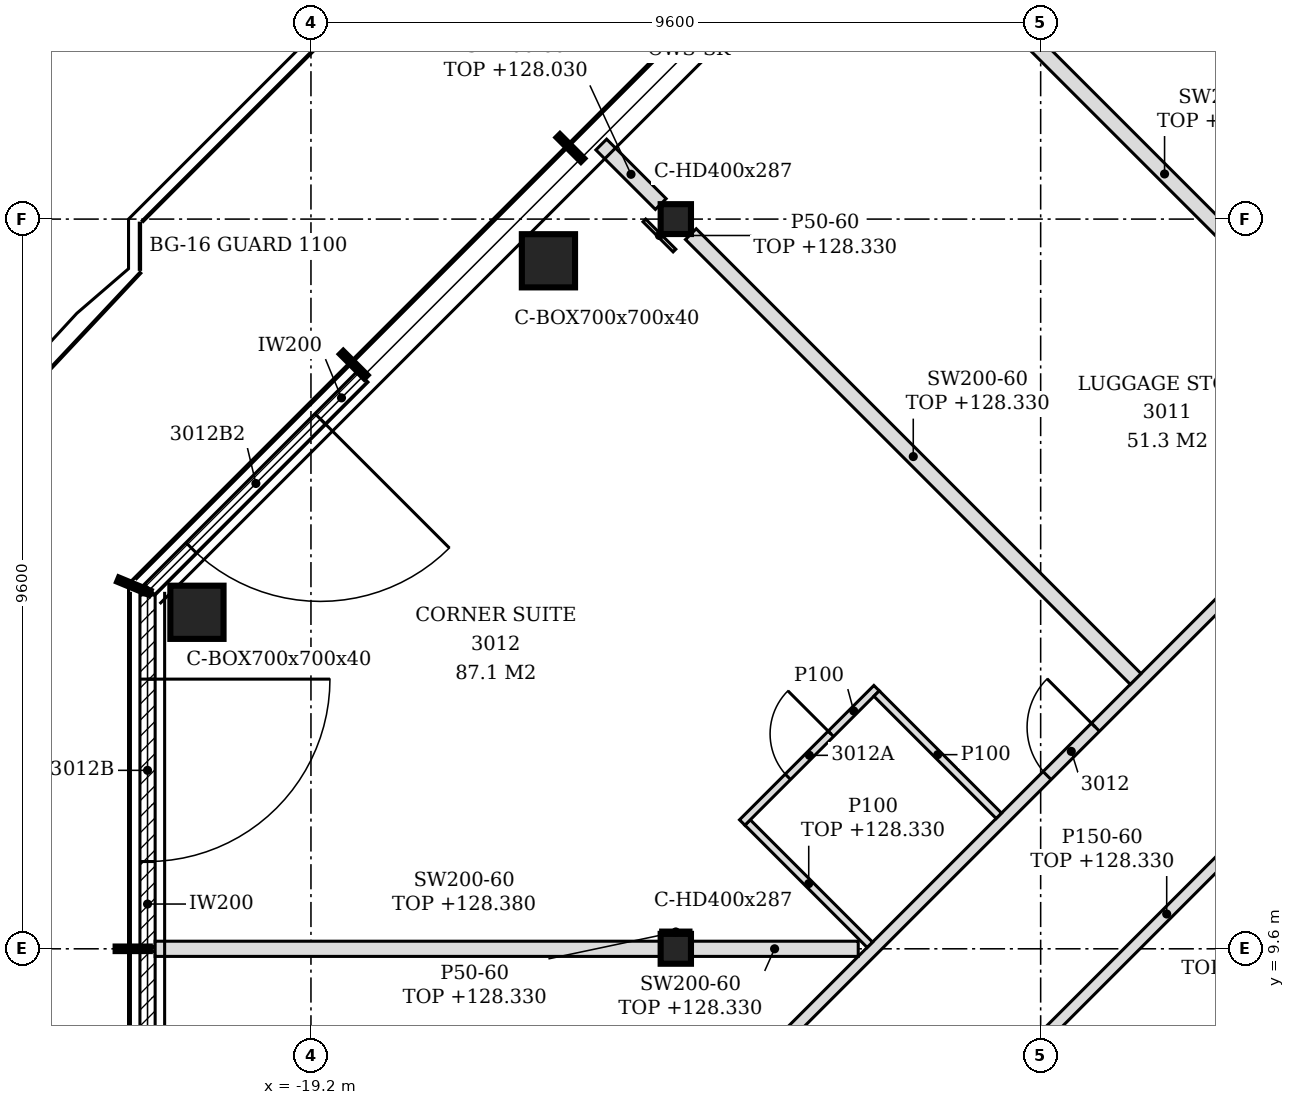
"""IFC4 building model, lengths in metres.
Left out: names, types, materials, properties, quantities, classifications, styles, units other than length and angle.
Written with IfcOpenShell. Run it as: python <this file> out.ifc"""

import sys

from ifc_helpers import new_model, si_unit, direction, frame, frame_2d, origin, origin_2d, place, context, subcontext, project, spatial, polyline, rectangle, hollow_rectangle, i_section, outline, extrude, element, fill, save


model = new_model("IFC4")
c1 = context("Model", 3, precision=1e-05, world=origin(), true_north=direction((0.0, 1.0)))
c2 = subcontext(c1, "Body", "Model", "MODEL_VIEW")
j1 = project(units=[si_unit("LENGTHUNIT", "METRE"), si_unit("PLANEANGLEUNIT", "RADIAN")], contexts=[c1])
p1 = place(None, origin())
s1 = spatial("IfcSite", under=j1, at=p1, CompositionType="ELEMENT")
p2 = place(p1, origin())
s2 = spatial("IfcBuilding", under=s1, at=p2, CompositionType="ELEMENT")
p3 = place(p2, frame((0.0, 0.0, 125.4)))
s3 = spatial("IfcBuildingStorey", under=s2, at=p3, CompositionType="ELEMENT", Elevation=125.4)
for number, where, z_axis, x_axis in (
    (1, (-16.076, 18.652, -0.15), (0.0, 0.0, 1.0), (1.0, 0.0, 0.0)),
    (2, (-20.7, 14.027, -0.15), (0.0, 0.0, 1.0), (1.0, 0.0, 0.0)),
):
    element("IfcColumn", number, at=place(p3, frame(where, z_axis=z_axis, x_axis=x_axis)), inside=s3, PredefinedType="COLUMN", context=c2, shape_type="SweptSolid", body=[
        extrude(hollow_rectangle(XDim=0.7, YDim=0.7, WallThickness=0.04, at=origin_2d()), origin(), (0.0, 0.0, 1.0), 3.6),
    ])
for number, where, z_axis, x_axis in (
    (3, (-14.4, 9.6, -0.15), (0.0, 0.0, 1.0), (1.0, 0.0, 0.0)),
    (4, (-14.4, 19.2, -0.15), (0.0, 0.0, 1.0), (1.0, 0.0, 0.0)),
):
    element("IfcColumn", number, at=place(p3, frame(where, z_axis=z_axis, x_axis=x_axis)), inside=s3, PredefinedType="COLUMN", context=c2, shape_type="SweptSolid", body=[
        extrude(i_section(OverallWidth=0.399, OverallDepth=0.393, WebThickness=0.023, FlangeThickness=0.037, FilletRadius=0.015, at=origin_2d()), origin(), (0.0, 0.0, 1.0), 3.6),
    ])
p4 = place(p3, frame((-18.521, 17.126, 0.0), z_axis=(0.0, 0.0, 1.0), x_axis=(-0.707106781187, -0.707106781187, 0.0)))
e5 = element("IfcWall", 5, at=p4, inside=s3, PredefinedType="NOTDEFINED", context=c2, shape_type="SweptSolid", body=[
    extrude(rectangle(XDim=3.962, YDim=0.2, at=frame_2d((1.981, 0.0))), origin(), (0.0, 0.0, 1.0), 3.45),
])
p5 = place(p4, frame((0.786, 0.0, 0.0)))
e6 = element("IfcOpeningElement", 6, at=p5, cuts=e5, PredefinedType="OPENING", context=c2, shape_type="SweptSolid", body=[
    extrude(rectangle(XDim=2.4, YDim=2.4, at=frame_2d((1.2, 1.2))), frame((0.0, 0.11, 0.0), z_axis=(0.0, -1.0, 0.0), x_axis=(1.0, 0.0, 0.0)), (0.0, 0.0, 1.0), 0.22),
])
p6 = place(p3, frame((-21.35, 14.256, 0.0), z_axis=(0.0, 0.0, 1.0), x_axis=(0.0, -1.0, 0.0)))
e7 = element("IfcWall", 7, at=p6, inside=s3, PredefinedType="NOTDEFINED", context=c2, shape_type="SweptSolid", body=[
    extrude(rectangle(XDim=4.626, YDim=0.2, at=frame_2d((2.313, 0.0))), origin(), (0.0, 0.0, 1.0), 3.45),
])
p7 = place(p6, frame((1.108, 0.0, 0.0)))
e8 = element("IfcOpeningElement", 8, at=p7, cuts=e7, PredefinedType="OPENING", context=c2, shape_type="SweptSolid", body=[
    extrude(rectangle(XDim=2.4, YDim=2.4, at=frame_2d((1.2, 1.2))), frame((0.0, 0.11, 0.0), z_axis=(0.0, -1.0, 0.0), x_axis=(1.0, 0.0, 0.0)), (0.0, 0.0, 1.0), 0.22),
])
p8 = place(p3, frame((-21.35, 9.57, 0.0), z_axis=(0.0, 0.0, 1.0), x_axis=(0.0, -1.0, 0.0)))
e9 = element("IfcWall", 9, at=p8, inside=s3, PredefinedType="NOTDEFINED", context=c2, shape_type="SweptSolid", body=[
    extrude(rectangle(XDim=4.74, YDim=0.2, at=frame_2d((2.37, 0.0))), origin(), (0.0, 0.0, 1.0), 3.45),
])
p9 = place(p8, frame((1.17, 0.0, 0.0)))
e10 = element("IfcOpeningElement", 10, at=p9, cuts=e9, PredefinedType="OPENING", context=c2, shape_type="SweptSolid", body=[
    extrude(rectangle(XDim=2.4, YDim=2.4, at=frame_2d((1.2, 1.2))), frame((0.0, 0.11, 0.0), z_axis=(0.0, -1.0, 0.0), x_axis=(1.0, 0.0, 0.0)), (0.0, 0.0, 1.0), 0.22),
])
p10 = place(p3, frame((-10.875, 7.125, 0.0), z_axis=(0.0, 0.0, 1.0), x_axis=(0.707106781187, 0.707106781187, 0.0)))
e11 = element("IfcWall", 11, at=p10, inside=s3, PredefinedType="PARTITIONING", context=c2, shape_type="SweptSolid", body=[
    extrude(rectangle(XDim=8.296, YDim=0.15, at=frame_2d((4.148, 0.0))), origin(), (0.0, 0.0, 1.0), 2.93),
])
p11 = place(p3, frame((-13.275, 8.119, 0.0), z_axis=(0.0, 0.0, 1.0), x_axis=(0.707099678619, 0.707113883683, 0.0)))
e12 = element("IfcWall", 12, at=p11, inside=s3, PredefinedType="PARTITIONING", context=c2, shape_type="SweptSolid", body=[
    extrude(rectangle(XDim=17.187, YDim=0.15, at=frame_2d((8.593, 0.0))), origin(), (0.0, 0.0, 1.0), 2.73),
])
p12 = place(p11, frame((9.073, 0.0, 0.0)))
e13 = element("IfcOpeningElement", 13, at=p12, cuts=e12, PredefinedType="OPENING", context=c2, shape_type="SweptSolid", body=[
    extrude(rectangle(XDim=0.9, YDim=2.1, at=frame_2d((0.45, 1.05))), frame((0.0, 0.085, 0.0), z_axis=(0.0, -1.0, 0.0), x_axis=(1.0, 0.0, 0.0)), (0.0, 0.0, 1.0), 0.17),
])
p13 = place(p11, frame((5.317, 0.0, 0.0)))
e14 = element("IfcOpeningElement", 14, at=p13, cuts=e12, PredefinedType="OPENING", context=c2, shape_type="SweptSolid", body=[
    extrude(rectangle(XDim=0.9, YDim=2.1, at=frame_2d((0.45, 1.05))), frame((0.0, 0.085, 0.0), z_axis=(0.0, -1.0, 0.0), x_axis=(1.0, 0.0, 0.0)), (0.0, 0.0, 1.0), 0.17),
])
p14 = place(p3, frame((-21.25, 9.6, 0.0), z_axis=(0.0, 0.0, 1.0), x_axis=(1.0, 0.0, 0.0)))
e15 = element("IfcWall", 15, at=p14, inside=s3, PredefinedType="PARTITIONING", context=c2, shape_type="SweptSolid", body=[
    extrude(outline(polyline([(0.0, 0.0), (6.65, 0.0), (6.65, 2.98), (0.7, 2.98), (0.698, 2.93), (0.4, 2.93), (0.398, 2.98), (0.0, 2.98), (0.0, 0.0)])), frame((0.0, 0.1, 0.0), z_axis=(0.0, -1.0, 0.0), x_axis=(1.0, 0.0, 0.0)), (0.0, 0.0, 1.0), 0.2),
])
p15 = place(p3, frame((-14.2, 9.6, 0.0), z_axis=(0.0, 0.0, 1.0), x_axis=(1.0, 0.0, 0.0)))
e16 = element("IfcWall", 16, at=p15, inside=s3, PredefinedType="PARTITIONING", context=c2, shape_type="SweptSolid", body=[
    extrude(rectangle(XDim=2.2, YDim=0.2, at=frame_2d((1.1, 0.0))), origin(), (0.0, 0.0, 1.0), 2.93),
])
p16 = place(p3, frame((-11.847, 9.653, 0.0), z_axis=(0.0, 0.0, 1.0), x_axis=(-0.707106781187, 0.707106781187, 0.0)))
e17 = element("IfcWall", 17, at=p16, inside=s3, PredefinedType="PARTITIONING", context=c2, shape_type="SweptSolid", body=[
    extrude(rectangle(XDim=2.275, YDim=0.1, at=frame_2d((1.137, 0.0))), origin(), (0.0, 0.0, 1.0), 2.93),
])
p17 = place(p3, frame((-13.526, 11.262, 0.0), z_axis=(0.0, 0.0, 1.0), x_axis=(0.707106781187, 0.707106781187, 0.0)))
e18 = element("IfcWall", 18, at=p17, inside=s3, PredefinedType="PARTITIONING", context=c2, shape_type="SweptSolid", body=[
    extrude(rectangle(XDim=2.5, YDim=0.1, at=frame_2d((1.25, 0.0))), origin(), (0.0, 0.0, 1.0), 3.45),
])
p18 = place(p17, frame((0.85, 0.0, 0.0)))
e19 = element("IfcOpeningElement", 19, at=p18, cuts=e18, PredefinedType="OPENING", context=c2, shape_type="SweptSolid", body=[
    extrude(rectangle(XDim=0.8, YDim=2.1, at=frame_2d((0.4, 1.05))), frame((0.0, 0.06, 0.0), z_axis=(0.0, -1.0, 0.0), x_axis=(1.0, 0.0, 0.0)), (0.0, 0.0, 1.0), 0.12),
])
p19 = place(p3, frame((-10.15, 11.35, 0.0), z_axis=(0.0, 0.0, 1.0), x_axis=(-0.707160441348, 0.707053116953, 0.0)))
e20 = element("IfcWall", 20, at=p19, inside=s3, PredefinedType="PARTITIONING", context=c2, shape_type="SweptSolid", body=[
    extrude(rectangle(XDim=2.275, YDim=0.1, at=frame_2d((1.137, 0.0))), origin(), (0.0, 0.0, 1.0), 3.45),
])
p20 = place(p3, frame((-8.35, 13.15, 0.0), z_axis=(0.0, 0.0, 1.0), x_axis=(-0.707092030896, 0.707121531169, 0.0)))
e21 = element("IfcWall", 21, at=p20, inside=s3, PredefinedType="PARTITIONING", context=c2, shape_type="SweptSolid", body=[
    extrude(rectangle(XDim=8.276, YDim=0.2, at=frame_2d((4.138, 0.0))), origin(), (0.0, 0.0, 1.0), 2.93),
])
p21 = place(p3, frame((-4.838, 16.662, 0.0), z_axis=(0.0, 0.0, 1.0), x_axis=(-0.707120561855, 0.707093000249, 0.0)))
e22 = element("IfcWall", 22, at=p21, inside=s3, PredefinedType="PARTITIONING", context=c2, shape_type="SweptSolid", body=[
    extrude(rectangle(XDim=8.858, YDim=0.2, at=frame_2d((4.429, 0.0))), origin(), (0.0, 0.0, 1.0), 2.73),
])
p22 = place(p3, frame((-14.598, 19.398, 0.0), z_axis=(0.0, 0.0, 1.0), x_axis=(-0.707106781187, 0.707106781187, 0.0)))
e23 = element("IfcWall", 23, at=p22, inside=s3, PredefinedType="PARTITIONING", context=c2, shape_type="SweptSolid", body=[
    extrude(rectangle(XDim=1.107, YDim=0.2, at=frame_2d((0.554, 0.0))), origin(), (0.0, 0.0, 1.0), 2.63),
])
p23 = place(p3, frame((-14.6, 9.822, 0.0), z_axis=(0.0, 0.0, 1.0), x_axis=(1.0, 0.0, 0.0)))
e24 = element("IfcWall", 24, at=p23, inside=s3, PredefinedType="PARTITIONING", context=c2, shape_type="SweptSolid", body=[
    extrude(rectangle(XDim=0.399, YDim=0.05, at=frame_2d((0.2, 0.0))), origin(), (0.0, 0.0, 1.0), 2.93),
])
p24 = place(p3, frame((-14.418, 18.786, 0.0), z_axis=(0.0, 0.0, 1.0), x_axis=(-0.707106781187, 0.707106781187, 0.0)))
e25 = element("IfcWall", 25, at=p24, inside=s3, PredefinedType="PARTITIONING", context=c2, shape_type="SweptSolid", body=[
    extrude(rectangle(XDim=0.56, YDim=0.05, at=frame_2d((0.28, 0.0))), origin(), (0.0, 0.0, 1.0), 2.93),
])
p25 = place(p5, origin())
e26 = element("IfcDoor", 26, at=p25, inside=s3, OperationType="SINGLE_SWING_LEFT", PredefinedType="DOOR", context=c2, shape_type="SweptSolid", body=[
    extrude(rectangle(XDim=2.4, YDim=2.4, at=frame_2d((1.2, 1.2))), frame((0.0, 0.025, 0.0), z_axis=(0.0, -1.0, 0.0), x_axis=(1.0, 0.0, 0.0)), (0.0, 0.0, 1.0), 0.05),
])
fill(e6, e26)
p26 = place(p7, origin())
e27 = element("IfcDoor", 27, at=p26, inside=s3, OperationType="SINGLE_SWING_LEFT", PredefinedType="DOOR", context=c2, shape_type="SweptSolid", body=[
    extrude(rectangle(XDim=2.4, YDim=2.4, at=frame_2d((1.2, 1.2))), frame((0.0, 0.025, 0.0), z_axis=(0.0, -1.0, 0.0), x_axis=(1.0, 0.0, 0.0)), (0.0, 0.0, 1.0), 0.05),
])
fill(e8, e27)
p27 = place(p13, origin())
e28 = element("IfcDoor", 28, at=p27, inside=s3, OperationType="SINGLE_SWING_RIGHT", PredefinedType="DOOR", context=c2, shape_type="SweptSolid", body=[
    extrude(rectangle(XDim=0.9, YDim=2.1, at=frame_2d((0.45, 1.05))), frame((0.0, 0.025, 0.0), z_axis=(0.0, -1.0, 0.0), x_axis=(1.0, 0.0, 0.0)), (0.0, 0.0, 1.0), 0.05),
])
fill(e14, e28)
p28 = place(p18, origin())
e29 = element("IfcDoor", 29, at=p28, inside=s3, OperationType="SINGLE_SWING_RIGHT", PredefinedType="DOOR", context=c2, shape_type="SweptSolid", body=[
    extrude(rectangle(XDim=0.8, YDim=2.1, at=frame_2d((0.4, 1.05))), frame((0.0, 0.025, 0.0), z_axis=(0.0, -1.0, 0.0), x_axis=(1.0, 0.0, 0.0)), (0.0, 0.0, 1.0), 0.05),
])
fill(e19, e29)
save(model, sys.argv[1])
